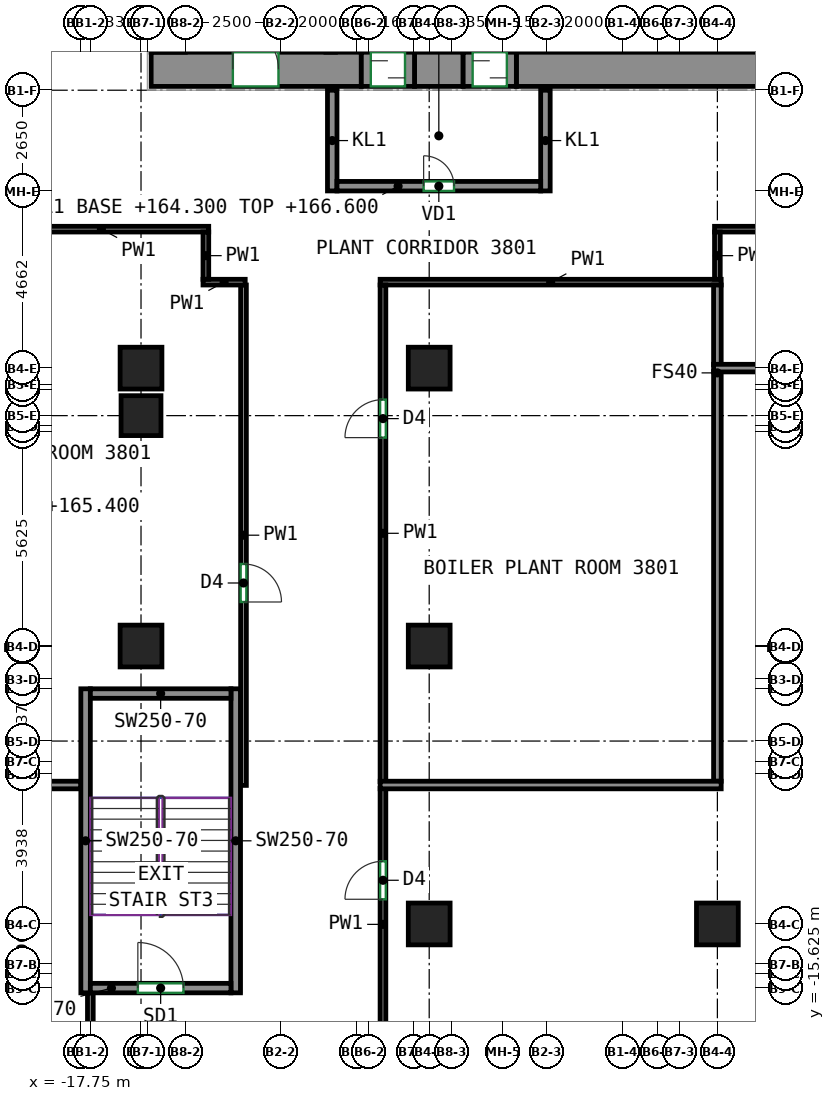
"""IFC4 building model, lengths in metres.
Left out: names, types, materials, properties, quantities, classifications, styles, units other than length and angle.
Written with IfcOpenShell. Run it as: python <this file> out.ifc"""

import sys

from ifc_helpers import new_model, si_unit, direction, frame, frame_2d, origin, origin_2d, place, context, subcontext, project, spatial, rectangle, extrude, source, transform, mapped, element, fill, save


model = new_model("IFC4")
c1 = context("Model", 3, precision=1e-05, world=origin(), true_north=direction((0.0, 1.0)))
c2 = subcontext(c1, "Body", "Model", "MODEL_VIEW")
j1 = project(units=[si_unit("LENGTHUNIT", "METRE"), si_unit("PLANEANGLEUNIT", "RADIAN")], contexts=[c1])
p1 = place(None, origin())
s1 = spatial("IfcSite", under=j1, at=p1, CompositionType="ELEMENT")
p2 = place(p1, origin())
s2 = spatial("IfcBuilding", under=s1, at=p2, CompositionType="ELEMENT")
p3 = place(p2, frame((0.0, 0.0, 164.3)))
s3 = spatial("IfcBuildingStorey", under=s2, at=p3, CompositionType="ELEMENT", Elevation=164.3)
m1 = source(origin(), c2, "Body", "SweptSolid", [
    extrude(rectangle(XDim=1.1, YDim=1.1, at=origin_2d()), origin(), (0.0, 0.0, 1.0), 2.3),
])
for number, where, z_axis, x_axis in (
    (1, (-16.167, -6.625, 0.0), (0.0, 0.0, 1.0), (1.0, 0.0, 0.0)),
    (2, (-16.167, 0.688, 0.0), (0.0, 0.0, 1.0), (1.0, 0.0, 0.0)),
    (3, (-8.583, -13.938, 0.0), (0.0, 0.0, 1.0), (1.0, 0.0, 0.0)),
    (4, (-8.583, -6.625, 0.0), (0.0, 0.0, 1.0), (1.0, 0.0, 0.0)),
    (5, (-8.583, 0.688, 0.0), (0.0, 0.0, 1.0), (1.0, 0.0, 0.0)),
):
    element("IfcColumn", number, at=place(p3, frame(where, z_axis=z_axis, x_axis=x_axis)), inside=s3, PredefinedType="COLUMN", context=c2, shape_type="MappedRepresentation", body=[
        mapped(m1, transform((0.0, 0.0, 0.0))),
    ])
m2 = source(origin(), c2, "Body", "SweptSolid", [
    extrude(rectangle(XDim=1.1, YDim=1.1, at=origin_2d()), origin(), (0.0, 0.0, 1.0), 3.8),
])
p4 = place(p3, frame((-1.0, -13.938, 0.0), z_axis=(0.0, 0.0, 1.0), x_axis=(1.0, 0.0, 0.0)))
e6 = element("IfcColumn", 6, at=p4, inside=s3, PredefinedType="COLUMN", context=c2, shape_type="MappedRepresentation", body=[
    mapped(m2, transform((0.0, 0.0, 0.0))),
])
m3 = source(origin(), c2, "Body", "SweptSolid", [
    extrude(rectangle(XDim=1.05, YDim=1.05, at=origin_2d()), origin(), (0.0, 0.0, 1.0), 3.8),
])
p5 = place(p3, frame((-16.167, -0.562, 0.0), z_axis=(0.0, 0.0, 1.0), x_axis=(1.0, 0.0, 0.0)))
e7 = element("IfcColumn", 7, at=p5, inside=s3, PredefinedType="COLUMN", context=c2, shape_type="MappedRepresentation", body=[
    mapped(m3, transform((0.0, 0.0, 0.0))),
])
m4 = source(origin(), c2, "Body", "SweptSolid", [
    extrude(rectangle(XDim=5.53, YDim=0.9, at=frame_2d((2.765, 0.0))), origin(), (0.0, 0.0, 1.0), 3.8),
])
p6 = place(p3, frame((-15.9, 8.55, 0.0), z_axis=(0.0, 0.0, 1.0), x_axis=(1.0, 0.0, 0.0)))
e8 = element("IfcWall", 8, at=p6, inside=s3, PredefinedType="SHEAR", context=c2, shape_type="MappedRepresentation", body=[
    mapped(m4, transform((0.0, 0.0, 0.0))),
])
p7 = place(p6, frame((2.15, 0.0, 0.0)))
e9 = element("IfcOpeningElement", 9, at=p7, cuts=e8, PredefinedType="OPENING", context=c2, shape_type="SweptSolid", body=[
    extrude(rectangle(XDim=1.2, YDim=2.1, at=frame_2d((0.6, 1.05))), frame((0.0, 0.46, 0.0), z_axis=(0.0, -1.0, 0.0), x_axis=(1.0, 0.0, 0.0)), (0.0, 0.0, 1.0), 0.92),
])
m5 = source(origin(), c2, "Body", "SweptSolid", [
    extrude(rectangle(XDim=1.28, YDim=0.9, at=frame_2d((0.64, 0.0))), origin(), (0.0, 0.0, 1.0), 3.8),
])
p8 = place(p3, frame((-8.97, 8.55, 0.0), z_axis=(0.0, 0.0, 1.0), x_axis=(1.0, 0.0, 0.0)))
e10 = element("IfcWall", 10, at=p8, inside=s3, PredefinedType="SHEAR", context=c2, shape_type="MappedRepresentation", body=[
    mapped(m5, transform((0.0, 0.0, 0.0))),
])
m6 = source(origin(), c2, "Body", "SweptSolid", [
    extrude(rectangle(XDim=14.18, YDim=0.9, at=frame_2d((7.09, 0.0))), origin(), (0.0, 0.0, 1.0), 3.8),
])
p9 = place(p3, frame((-6.29, 8.55, 0.0), z_axis=(0.0, 0.0, 1.0), x_axis=(1.0, 0.0, 0.0)))
e11 = element("IfcWall", 11, at=p9, inside=s3, PredefinedType="SHEAR", context=c2, shape_type="MappedRepresentation", body=[
    mapped(m6, transform((0.0, 0.0, 0.0))),
])
m7 = source(origin(), c2, "Body", "SweptSolid", [
    extrude(rectangle(XDim=8.0, YDim=0.25, at=frame_2d((4.0, 0.0))), origin(), (0.0, 0.0, 1.0), 3.8),
])
for number, where, z_axis, x_axis in (
    (12, (-17.625, -15.75, 0.0), (0.0, 0.0, 1.0), (0.0, 1.0, 0.0)),
    (13, (-13.675, -15.75, 0.0), (0.0, 0.0, 1.0), (0.0, 1.0, 0.0)),
):
    element("IfcWall", number, at=place(p3, frame(where, z_axis=z_axis, x_axis=x_axis)), inside=s3, PredefinedType="SHEAR", context=c2, shape_type="MappedRepresentation", body=[
        mapped(m7, transform((0.0, 0.0, 0.0))),
    ])
m8 = source(origin(), c2, "Body", "SweptSolid", [
    extrude(rectangle(XDim=3.7, YDim=0.25, at=frame_2d((1.85, 0.0))), origin(), (0.0, 0.0, 1.0), 3.8),
])
p10 = place(p3, frame((-17.5, -15.625, 0.0), z_axis=(0.0, 0.0, 1.0), x_axis=(1.0, 0.0, 0.0)))
e14 = element("IfcWall", 14, at=p10, inside=s3, PredefinedType="SHEAR", context=c2, shape_type="MappedRepresentation", body=[
    mapped(m8, transform((0.0, 0.0, 0.0))),
])
p11 = place(p10, frame((1.25, 0.0, 0.0)))
e15 = element("IfcOpeningElement", 15, at=p11, cuts=e14, PredefinedType="OPENING", context=c2, shape_type="SweptSolid", body=[
    extrude(rectangle(XDim=1.2, YDim=2.1, at=frame_2d((0.6, 1.05))), frame((0.0, 0.135, 0.0), z_axis=(0.0, -1.0, 0.0), x_axis=(1.0, 0.0, 0.0)), (0.0, 0.0, 1.0), 0.27),
])
p12 = place(p3, frame((-17.5, -7.875, 0.0), z_axis=(0.0, 0.0, 1.0), x_axis=(1.0, 0.0, 0.0)))
e16 = element("IfcWall", 16, at=p12, inside=s3, PredefinedType="SHEAR", context=c2, shape_type="MappedRepresentation", body=[
    mapped(m8, transform((0.0, 0.0, 0.0))),
])
m9 = source(origin(), c2, "Body", "SweptSolid", [
    extrude(rectangle(XDim=2.65, YDim=0.25, at=frame_2d((1.325, 0.0))), origin(), (0.0, 0.0, 1.0), 3.8),
])
for number, where, z_axis, x_axis in (
    (17, (-11.135, 5.35, 0.0), (0.0, 0.0, 1.0), (0.0, 1.0, 0.0)),
    (18, (-5.525, 5.35, 0.0), (0.0, 0.0, 1.0), (0.0, 1.0, 0.0)),
):
    element("IfcWall", number, at=place(p3, frame(where, z_axis=z_axis, x_axis=x_axis)), inside=s3, PredefinedType="PARTITIONING", context=c2, shape_type="MappedRepresentation", body=[
        mapped(m9, transform((0.0, 0.0, 0.0))),
    ])
m10 = source(origin(), c2, "Body", "SweptSolid", [
    extrude(rectangle(XDim=5.36, YDim=0.25, at=frame_2d((2.68, 0.0))), origin(), (0.0, 0.0, 1.0), 2.3),
])
p13 = place(p3, frame((-11.01, 5.475, 0.0), z_axis=(0.0, 0.0, 1.0), x_axis=(1.0, 0.0, 0.0)))
e19 = element("IfcWall", 19, at=p13, inside=s3, PredefinedType="PARTITIONING", context=c2, shape_type="MappedRepresentation", body=[
    mapped(m10, transform((0.0, 0.0, 0.0))),
])
p14 = place(p13, frame((2.28, 0.0, 0.0)))
e20 = element("IfcOpeningElement", 20, at=p14, cuts=e19, PredefinedType="OPENING", context=c2, shape_type="SweptSolid", body=[
    extrude(rectangle(XDim=0.8, YDim=2.0, at=frame_2d((0.4, 1.0))), frame((0.0, 0.135, 0.0), z_axis=(0.0, -1.0, 0.0), x_axis=(1.0, 0.0, 0.0)), (0.0, 0.0, 1.0), 0.27),
])
m11 = source(origin(), c2, "Body", "SweptSolid", [
    extrude(rectangle(XDim=1.4, YDim=0.9, at=frame_2d((0.7, 0.0))), origin(), (0.0, 0.0, 1.0), 2.7),
])
p15 = place(p3, frame((-10.37, 8.55, 0.0), z_axis=(0.0, 0.0, 1.0), x_axis=(1.0, 0.0, 0.0)))
e21 = element("IfcWall", 21, at=p15, inside=s3, PredefinedType="PARTITIONING", context=c2, shape_type="MappedRepresentation", body=[
    mapped(m11, transform((0.0, 0.0, 0.0))),
])
p16 = place(p15, frame((0.25, 0.0, 0.0)))
e22 = element("IfcOpeningElement", 22, at=p16, cuts=e21, PredefinedType="OPENING", context=c2, shape_type="SweptSolid", body=[
    extrude(rectangle(XDim=0.9, YDim=2.1, at=frame_2d((0.45, 1.05))), frame((0.0, 0.46, 0.0), z_axis=(0.0, -1.0, 0.0), x_axis=(1.0, 0.0, 0.0)), (0.0, 0.0, 1.0), 0.92),
])
m12 = source(origin(), c2, "Body", "SweptSolid", [
    extrude(rectangle(XDim=1.4, YDim=0.9, at=frame_2d((0.7, 0.0))), origin(), (0.0, 0.0, 1.0), 2.7),
])
p17 = place(p3, frame((-7.69, 8.55, 0.0), z_axis=(0.0, 0.0, 1.0), x_axis=(1.0, 0.0, 0.0)))
e23 = element("IfcWall", 23, at=p17, inside=s3, PredefinedType="PARTITIONING", context=c2, shape_type="MappedRepresentation", body=[
    mapped(m12, transform((0.0, 0.0, 0.0))),
])
p18 = place(p17, frame((0.25, 0.0, 0.0)))
e24 = element("IfcOpeningElement", 24, at=p18, cuts=e23, PredefinedType="OPENING", context=c2, shape_type="SweptSolid", body=[
    extrude(rectangle(XDim=0.9, YDim=2.1, at=frame_2d((0.45, 1.05))), frame((0.0, 0.46, 0.0), z_axis=(0.0, -1.0, 0.0), x_axis=(1.0, 0.0, 0.0)), (0.0, 0.0, 1.0), 0.92),
])
p19 = place(p3, frame((-20.034, 4.344, 0.0), z_axis=(0.0, 0.0, 1.0), x_axis=(1.0, 0.0, 0.0)))
e25 = element("IfcWall", 25, at=p19, inside=s3, PredefinedType="PARTITIONING", context=c2, shape_type="SweptSolid", body=[
    extrude(rectangle(XDim=5.649, YDim=0.15, at=frame_2d((2.824, 0.0))), origin(), (0.0, 0.0, 1.0), 3.8),
])
p20 = place(p3, frame((-13.47, 2.875, 0.0), z_axis=(0.0, 0.0, 1.0), x_axis=(0.0, -1.0, 0.0)))
e26 = element("IfcWall", 26, at=p20, inside=s3, PredefinedType="PARTITIONING", context=c2, shape_type="SweptSolid", body=[
    extrude(rectangle(XDim=13.167, YDim=0.15, at=frame_2d((6.583, 0.0))), origin(), (0.0, 0.0, 1.0), 3.8),
])
p21 = place(p20, frame((7.341, 0.0, 0.0)))
e27 = element("IfcOpeningElement", 27, at=p21, cuts=e26, PredefinedType="OPENING", context=c2, shape_type="SweptSolid", body=[
    extrude(rectangle(XDim=1.0, YDim=2.1, at=frame_2d((0.5, 1.05))), frame((0.0, 0.085, 0.0), z_axis=(0.0, -1.0, 0.0), x_axis=(1.0, 0.0, 0.0)), (0.0, 0.0, 1.0), 0.17),
])
p22 = place(p3, frame((-14.535, 2.95, 0.0), z_axis=(0.0, 0.0, 1.0), x_axis=(1.0, 0.0, 0.0)))
e28 = element("IfcWall", 28, at=p22, inside=s3, PredefinedType="PARTITIONING", context=c2, shape_type="SweptSolid", body=[
    extrude(rectangle(XDim=1.11, YDim=0.15, at=frame_2d((0.555, 0.0))), origin(), (0.0, 0.0, 1.0), 3.8),
])
p23 = place(p3, frame((-14.46, 4.269, 0.0), z_axis=(0.0, 0.0, 1.0), x_axis=(0.0, -1.0, 0.0)))
e29 = element("IfcWall", 29, at=p23, inside=s3, PredefinedType="PARTITIONING", context=c2, shape_type="SweptSolid", body=[
    extrude(rectangle(XDim=1.244, YDim=0.15, at=frame_2d((0.622, 0.0))), origin(), (0.0, 0.0, 1.0), 3.8),
])
p24 = place(p3, frame((-9.875, 2.95, 0.0), z_axis=(0.0, 0.0, 1.0), x_axis=(1.0, 0.0, 0.0)))
e30 = element("IfcWall", 30, at=p24, inside=s3, PredefinedType="PARTITIONING", context=c2, shape_type="SweptSolid", body=[
    extrude(rectangle(XDim=8.975, YDim=0.15, at=frame_2d((4.488, 0.0))), origin(), (0.0, 0.0, 1.0), 3.8),
])
p25 = place(p3, frame((-9.8, -10.192, 0.0), z_axis=(0.0, 0.0, 1.0), x_axis=(0.0, 1.0, 0.0)))
e31 = element("IfcWall", 31, at=p25, inside=s3, PredefinedType="PARTITIONING", context=c2, shape_type="SweptSolid", body=[
    extrude(rectangle(XDim=13.067, YDim=0.15, at=frame_2d((6.533, 0.0))), origin(), (0.0, 0.0, 1.0), 3.8),
])
p26 = place(p25, frame((9.051, 0.0, 0.0)))
e32 = element("IfcOpeningElement", 32, at=p26, cuts=e31, PredefinedType="OPENING", context=c2, shape_type="SweptSolid", body=[
    extrude(rectangle(XDim=1.0, YDim=2.1, at=frame_2d((0.5, 1.05))), frame((0.0, 0.085, 0.0), z_axis=(0.0, -1.0, 0.0), x_axis=(1.0, 0.0, 0.0)), (0.0, 0.0, 1.0), 0.17),
])
p27 = place(p3, frame((-9.8, -17.525, 0.0), z_axis=(0.0, 0.0, 1.0), x_axis=(0.0, 1.0, 0.0)))
e33 = element("IfcWall", 33, at=p27, inside=s3, PredefinedType="PARTITIONING", context=c2, shape_type="SweptSolid", body=[
    extrude(rectangle(XDim=7.153, YDim=0.15, at=frame_2d((3.576, 0.0))), origin(), (0.0, 0.0, 1.0), 3.8),
])
p28 = place(p27, frame((4.237, 0.0, 0.0)))
e34 = element("IfcOpeningElement", 34, at=p28, cuts=e33, PredefinedType="OPENING", context=c2, shape_type="SweptSolid", body=[
    extrude(rectangle(XDim=1.0, YDim=2.1, at=frame_2d((0.5, 1.05))), frame((0.0, 0.085, 0.0), z_axis=(0.0, -1.0, 0.0), x_axis=(1.0, 0.0, 0.0)), (0.0, 0.0, 1.0), 0.17),
])
p29 = place(p3, frame((-17.5, -15.75, 0.0), z_axis=(0.0, 0.0, 1.0), x_axis=(0.0, -1.0, 0.0)))
e35 = element("IfcWall", 35, at=p29, inside=s3, PredefinedType="PARTITIONING", context=c2, shape_type="SweptSolid", body=[
    extrude(rectangle(XDim=3.625, YDim=0.15, at=frame_2d((1.812, 0.0))), origin(), (0.0, 0.0, 1.0), 3.8),
])
p30 = place(p3, frame((-1.075, 4.344, 0.0), z_axis=(0.0, 0.0, 1.0), x_axis=(1.0, 0.0, 0.0)))
e36 = element("IfcWall", 36, at=p30, inside=s3, PredefinedType="PARTITIONING", context=c2, shape_type="SweptSolid", body=[
    extrude(rectangle(XDim=7.733, YDim=0.15, at=frame_2d((3.866, 0.0))), origin(), (0.0, 0.0, 1.0), 3.8),
])
p31 = place(p30, frame((5.829, 0.0, 0.0)))
e37 = element("IfcOpeningElement", 37, at=p31, cuts=e36, PredefinedType="OPENING", context=c2, shape_type="SweptSolid", body=[
    extrude(rectangle(XDim=0.9, YDim=2.1, at=frame_2d((0.45, 1.05))), frame((0.0, 0.085, 0.0), z_axis=(0.0, -1.0, 0.0), x_axis=(1.0, 0.0, 0.0)), (0.0, 0.0, 1.0), 0.17),
])
p32 = place(p3, frame((-1.0, 3.025, 0.0), z_axis=(0.0, 0.0, 1.0), x_axis=(0.0, 1.0, 0.0)))
e38 = element("IfcWall", 38, at=p32, inside=s3, PredefinedType="PARTITIONING", context=c2, shape_type="SweptSolid", body=[
    extrude(rectangle(XDim=1.244, YDim=0.15, at=frame_2d((0.622, 0.0))), origin(), (0.0, 0.0, 1.0), 3.8),
])
p33 = place(p3, frame((-25.78, -10.282, 0.0), z_axis=(0.0, 0.0, 1.0), x_axis=(1.0, 0.0, 0.0)))
e39 = element("IfcWall", 39, at=p33, inside=s3, PredefinedType="PARTITIONING", context=c2, shape_type="SweptSolid", body=[
    extrude(rectangle(XDim=8.03, YDim=0.2, at=frame_2d((4.015, 0.0))), origin(), (0.0, 0.0, 1.0), 3.8),
])
p34 = place(p3, frame((-1.0, -10.182, 0.0), z_axis=(0.0, 0.0, 1.0), x_axis=(0.0, 1.0, 0.0)))
e40 = element("IfcWall", 40, at=p34, inside=s3, PredefinedType="PARTITIONING", context=c2, shape_type="SweptSolid", body=[
    extrude(rectangle(XDim=10.78, YDim=0.2, at=frame_2d((5.39, 0.0))), origin(), (0.0, 0.0, 1.0), 3.8),
])
p35 = place(p3, frame((-9.874, -10.282, 0.0), z_axis=(0.0, 0.0, 1.0), x_axis=(1.0, 0.0, 0.0)))
e41 = element("IfcWall", 41, at=p35, inside=s3, PredefinedType="PARTITIONING", context=c2, shape_type="SweptSolid", body=[
    extrude(rectangle(XDim=8.974, YDim=0.2, at=frame_2d((4.487, 0.0))), origin(), (0.0, 0.0, 1.0), 3.8),
])
p36 = place(p3, frame((-1.0, 0.778, 0.0), z_axis=(0.0, 0.0, 1.0), x_axis=(0.0, 1.0, 0.0)))
e42 = element("IfcWall", 42, at=p36, inside=s3, PredefinedType="PARTITIONING", context=c2, shape_type="SweptSolid", body=[
    extrude(rectangle(XDim=2.096, YDim=0.2, at=frame_2d((1.048, 0.0))), origin(), (0.0, 0.0, 1.0), 3.8),
])
p37 = place(p3, frame((6.683, 0.688, 0.0), z_axis=(0.0, 0.0, 1.0), x_axis=(-1.0, 0.0, 0.0)))
e43 = element("IfcWall", 43, at=p37, inside=s3, PredefinedType="PARTITIONING", context=c2, shape_type="SweptSolid", body=[
    extrude(rectangle(XDim=7.783, YDim=0.2, at=frame_2d((3.892, 0.0))), origin(), (0.0, 0.0, 1.0), 3.8),
])
p38 = place(p14, origin())
e44 = element("IfcDoor", 44, at=p38, inside=s3, OperationType="SINGLE_SWING_LEFT", PredefinedType="DOOR", context=c2, shape_type="SweptSolid", body=[
    extrude(rectangle(XDim=0.8, YDim=2.0, at=frame_2d((0.4, 1.0))), frame((0.0, 0.025, 0.0), z_axis=(0.0, -1.0, 0.0), x_axis=(1.0, 0.0, 0.0)), (0.0, 0.0, 1.0), 0.05),
])
fill(e20, e44)
p39 = place(p16, origin())
e45 = element("IfcDoor", 45, at=p39, inside=s3, OperationType="SLIDING_TO_LEFT", PredefinedType="DOOR", context=c2, shape_type="SweptSolid", body=[
    extrude(rectangle(XDim=0.9, YDim=2.1, at=frame_2d((0.45, 1.05))), frame((0.0, 0.355, 0.0), z_axis=(0.0, -1.0, 0.0), x_axis=(1.0, 0.0, 0.0)), (0.0, 0.0, 1.0), 0.05),
])
fill(e22, e45)
p40 = place(p18, origin())
e46 = element("IfcDoor", 46, at=p40, inside=s3, OperationType="SLIDING_TO_RIGHT", PredefinedType="DOOR", context=c2, shape_type="SweptSolid", body=[
    extrude(rectangle(XDim=0.9, YDim=2.1, at=frame_2d((0.45, 1.05))), frame((0.0, 0.355, 0.0), z_axis=(0.0, -1.0, 0.0), x_axis=(1.0, 0.0, 0.0)), (0.0, 0.0, 1.0), 0.05),
])
fill(e24, e46)
p41 = place(p7, origin())
e47 = element("IfcDoor", 47, at=p41, inside=s3, OperationType="DOUBLE_DOOR_SINGLE_SWING", PredefinedType="DOOR", context=c2, shape_type="SweptSolid", body=[
    extrude(rectangle(XDim=1.2, YDim=2.1, at=frame_2d((0.6, 1.05))), frame((0.0, 0.355, 0.0), z_axis=(0.0, -1.0, 0.0), x_axis=(1.0, 0.0, 0.0)), (0.0, 0.0, 1.0), 0.05),
])
fill(e9, e47)
p42 = place(p11, origin())
e48 = element("IfcDoor", 48, at=p42, inside=s3, OperationType="DOUBLE_DOOR_SINGLE_SWING", PredefinedType="DOOR", context=c2, shape_type="SweptSolid", body=[
    extrude(rectangle(XDim=1.2, YDim=2.1, at=frame_2d((0.6, 1.05))), frame((0.0, 0.025, 0.0), z_axis=(0.0, -1.0, 0.0), x_axis=(1.0, 0.0, 0.0)), (0.0, 0.0, 1.0), 0.05),
])
fill(e15, e48)
p43 = place(p28, origin())
e49 = element("IfcDoor", 49, at=p43, inside=s3, OperationType="SINGLE_SWING_LEFT", PredefinedType="DOOR", context=c2, shape_type="SweptSolid", body=[
    extrude(rectangle(XDim=1.0, YDim=2.1, at=frame_2d((0.5, 1.05))), frame((0.0, 0.025, 0.0), z_axis=(0.0, -1.0, 0.0), x_axis=(1.0, 0.0, 0.0)), (0.0, 0.0, 1.0), 0.05),
])
fill(e34, e49)
p44 = place(p21, origin())
e50 = element("IfcDoor", 50, at=p44, inside=s3, OperationType="SINGLE_SWING_RIGHT", PredefinedType="DOOR", context=c2, shape_type="SweptSolid", body=[
    extrude(rectangle(XDim=1.0, YDim=2.1, at=frame_2d((0.5, 1.05))), frame((0.0, 0.025, 0.0), z_axis=(0.0, -1.0, 0.0), x_axis=(1.0, 0.0, 0.0)), (0.0, 0.0, 1.0), 0.05),
])
fill(e27, e50)
p45 = place(p26, origin())
e51 = element("IfcDoor", 51, at=p45, inside=s3, OperationType="SINGLE_SWING_LEFT", PredefinedType="DOOR", context=c2, shape_type="SweptSolid", body=[
    extrude(rectangle(XDim=1.0, YDim=2.1, at=frame_2d((0.5, 1.05))), frame((0.0, 0.025, 0.0), z_axis=(0.0, -1.0, 0.0), x_axis=(1.0, 0.0, 0.0)), (0.0, 0.0, 1.0), 0.05),
])
fill(e32, e51)
save(model, sys.argv[1])
